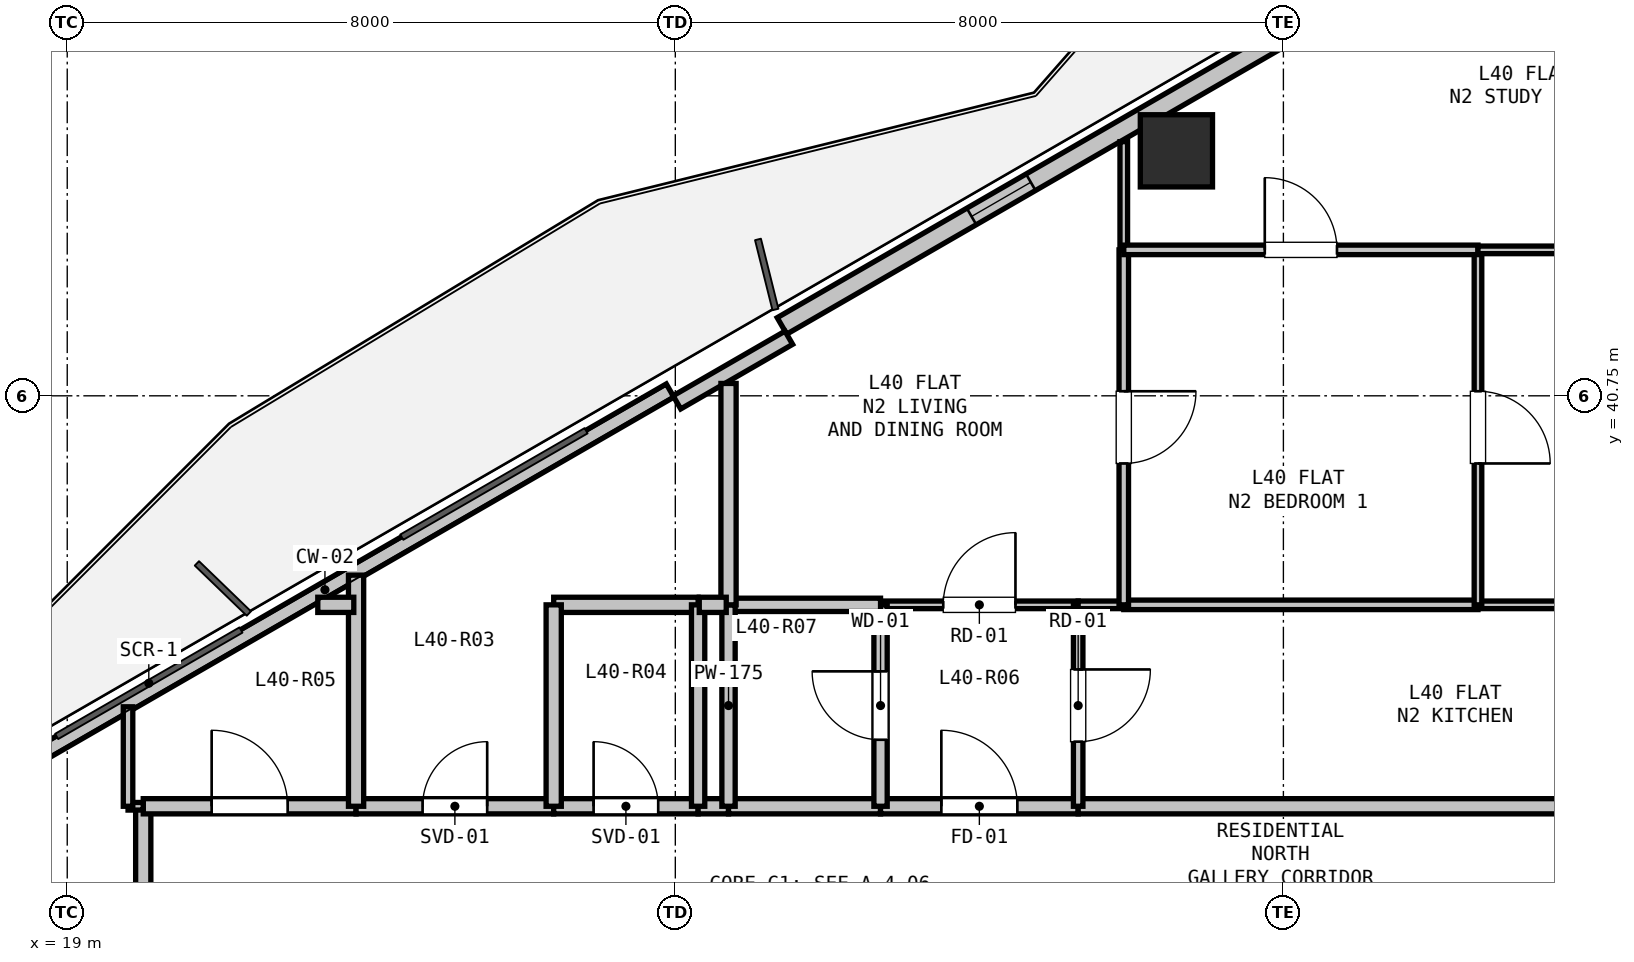
"""IFC4 building model, lengths in metres.
Left out: names, types, materials, properties, quantities, classifications, styles, units other than length and angle.
Written with IfcOpenShell. Run it as: python <this file> out.ifc"""

import sys

from ifc_helpers import new_model, si_unit, direction, frame, frame_2d, origin, origin_2d, place, context, subcontext, project, spatial, rectangle, hollow_rectangle, extrude, element, fill, save


model = new_model("IFC4")
c1 = context("Model", 3, precision=1e-05, world=origin(), true_north=direction((0.0, 1.0)))
c2 = subcontext(c1, "Body", "Model", "MODEL_VIEW")
j1 = project(units=[si_unit("LENGTHUNIT", "METRE"), si_unit("PLANEANGLEUNIT", "RADIAN")], contexts=[c1])
p1 = place(None, origin())
s1 = spatial("IfcSite", under=j1, at=p1, CompositionType="ELEMENT")
p2 = place(p1, origin())
s2 = spatial("IfcBuilding", under=s1, at=p2, CompositionType="ELEMENT")
p3 = place(p2, frame((0.0, 0.0, 144.3)))
s3 = spatial("IfcBuildingStorey", under=s2, at=p3, CompositionType="ELEMENT", Elevation=144.3)
p4 = place(p3, frame((33.593, 43.973, 0.0), z_axis=(0.0, 0.0, 1.0), x_axis=(1.0, 0.0, 0.0)))
e1 = element("IfcColumn", 1, at=p4, inside=s3, PredefinedType="COLUMN", context=c2, shape_type="SweptSolid", body=[
    extrude(hollow_rectangle(XDim=0.95, YDim=0.95, WallThickness=0.028, at=origin_2d()), origin(), (0.0, 0.0, 1.0), 3.3),
])
p5 = place(p3, frame((38.22, 47.338, 0.0), z_axis=(0.0, 0.0, 1.0), x_axis=(0.866035021055, -0.499983342029, 0.0)))
e2 = element("IfcWall", 2, at=p5, inside=s3, PredefinedType="SOLIDWALL", context=c2, shape_type="SweptSolid", body=[
    extrude(rectangle(XDim=4.617, YDim=0.25, at=frame_2d((2.309, 0.0))), origin(), (0.0, 0.0, 1.0), 2.68),
])
p6 = place(p3, frame((17.85, 35.577, 0.0), z_axis=(0.0, 0.0, 1.0), x_axis=(0.866026619769, 0.499997893847, 0.0)))
e3 = element("IfcWall", 3, at=p6, inside=s3, PredefinedType="PARAPET", context=c2, shape_type="SweptSolid", body=[
    extrude(rectangle(XDim=10.486, YDim=0.2, at=frame_2d((5.243, 0.0))), origin(), (0.0, 0.0, 1.0), 0.2),
])
p7 = place(p3, frame((28.403, 41.67, 0.0), z_axis=(0.0, 0.0, 1.0), x_axis=(0.86602239209, 0.500005216371, 0.0)))
e4 = element("IfcWall", 4, at=p7, inside=s3, PredefinedType="SOLIDWALL", context=c2, shape_type="SweptSolid", body=[
    extrude(rectangle(XDim=11.186, YDim=0.25, at=frame_2d((5.593, 0.0))), origin(), (0.0, 0.0, 1.0), 2.68),
])
p8 = place(p7, frame((2.88, 0.0, 0.9)))
e5 = element("IfcOpeningElement", 5, at=p8, cuts=e4, PredefinedType="OPENING", context=c2, shape_type="SweptSolid", body=[
    extrude(rectangle(XDim=0.9, YDim=1.4, at=frame_2d((0.45, 0.7))), frame((0.0, 0.135, 0.0), z_axis=(0.0, -1.0, 0.0), x_axis=(1.0, 0.0, 0.0)), (0.0, 0.0, 1.0), 0.27),
])
p9 = place(p3, frame((27.021, 40.664, 0.0), z_axis=(0.0, 0.0, 1.0), x_axis=(0.86605165483, 0.499954529098, 0.0)))
e6 = element("IfcWall", 6, at=p9, inside=s3, PredefinedType="PARAPET", context=c2, shape_type="SweptSolid", body=[
    extrude(rectangle(XDim=1.7, YDim=0.2, at=frame_2d((0.85, 0.0))), origin(), (0.0, 0.0, 1.0), 2.68),
])
p10 = place(p3, frame((20.0, 32.75, 0.0), z_axis=(0.0, 0.0, 1.0), x_axis=(0.0, 1.0, 0.0)))
e7 = element("IfcWall", 7, at=p10, inside=s3, PredefinedType="PARTITIONING", context=c2, shape_type="SweptSolid", body=[
    extrude(rectangle(XDim=2.6, YDim=0.2, at=frame_2d((1.3, 0.0))), origin(), (0.0, 0.0, 1.0), 2.433),
])
p11 = place(p3, frame((20.0, 35.35, 0.0), z_axis=(0.0, 0.0, 1.0), x_axis=(1.0, 0.0, 0.0)))
e8 = element("IfcWall", 8, at=p11, inside=s3, PredefinedType="PARTITIONING", context=c2, shape_type="SweptSolid", body=[
    extrude(rectangle(XDim=2.8, YDim=0.2, at=frame_2d((1.4, 0.0))), origin(), (0.0, 0.0, 1.0), 3.06),
])
p12 = place(p11, frame((0.9, 0.0, 0.0)))
e9 = element("IfcOpeningElement", 9, at=p12, cuts=e8, PredefinedType="OPENING", context=c2, shape_type="SweptSolid", body=[
    extrude(rectangle(XDim=1.0, YDim=2.15, at=frame_2d((0.5, 1.075))), frame((0.0, 0.11, 0.0), z_axis=(0.0, -1.0, 0.0), x_axis=(1.0, 0.0, 0.0)), (0.0, 0.0, 1.0), 0.22),
])
p13 = place(p3, frame((22.8, 35.35, 0.0), z_axis=(0.0, 0.0, 1.0), x_axis=(1.0, 0.0, 0.0)))
e10 = element("IfcWall", 10, at=p13, inside=s3, PredefinedType="PARTITIONING", context=c2, shape_type="SweptSolid", body=[
    extrude(rectangle(XDim=2.6, YDim=0.2, at=frame_2d((1.3, 0.0))), origin(), (0.0, 0.0, 1.0), 3.06),
])
p14 = place(p13, frame((0.875, 0.0, 0.0)))
e11 = element("IfcOpeningElement", 11, at=p14, cuts=e10, PredefinedType="OPENING", context=c2, shape_type="SweptSolid", body=[
    extrude(rectangle(XDim=0.85, YDim=2.1, at=frame_2d((0.425, 1.05))), frame((0.0, 0.11, 0.0), z_axis=(0.0, -1.0, 0.0), x_axis=(1.0, 0.0, 0.0)), (0.0, 0.0, 1.0), 0.22),
])
p15 = place(p3, frame((25.4, 35.35, 0.0), z_axis=(0.0, 0.0, 1.0), x_axis=(1.0, 0.0, 0.0)))
e12 = element("IfcWall", 12, at=p15, inside=s3, PredefinedType="PARTITIONING", context=c2, shape_type="SweptSolid", body=[
    extrude(rectangle(XDim=1.9, YDim=0.2, at=frame_2d((0.95, 0.0))), origin(), (0.0, 0.0, 1.0), 3.06),
])
p16 = place(p15, frame((0.525, 0.0, 0.0)))
e13 = element("IfcOpeningElement", 13, at=p16, cuts=e12, PredefinedType="OPENING", context=c2, shape_type="SweptSolid", body=[
    extrude(rectangle(XDim=0.85, YDim=2.1, at=frame_2d((0.425, 1.05))), frame((0.0, 0.11, 0.0), z_axis=(0.0, -1.0, 0.0), x_axis=(1.0, 0.0, 0.0)), (0.0, 0.0, 1.0), 0.22),
])
p17 = place(p3, frame((27.3, 35.35, 0.0), z_axis=(0.0, 0.0, 1.0), x_axis=(1.0, 0.0, 0.0)))
e14 = element("IfcWall", 14, at=p17, inside=s3, PredefinedType="PARTITIONING", context=c2, shape_type="SweptSolid", body=[
    extrude(rectangle(XDim=0.4, YDim=0.2, at=frame_2d((0.2, 0.0))), origin(), (0.0, 0.0, 1.0), 3.06),
])
p18 = place(p3, frame((27.7, 35.35, 0.0), z_axis=(0.0, 0.0, 1.0), x_axis=(1.0, 0.0, 0.0)))
e15 = element("IfcWall", 15, at=p18, inside=s3, PredefinedType="PARTITIONING", context=c2, shape_type="SweptSolid", body=[
    extrude(rectangle(XDim=2.0, YDim=0.2, at=frame_2d((1.0, 0.0))), origin(), (0.0, 0.0, 1.0), 3.06),
])
p19 = place(p3, frame((29.7, 35.35, 0.0), z_axis=(0.0, 0.0, 1.0), x_axis=(1.0, 0.0, 0.0)))
e16 = element("IfcWall", 16, at=p19, inside=s3, PredefinedType="PARTITIONING", context=c2, shape_type="SweptSolid", body=[
    extrude(rectangle(XDim=2.6, YDim=0.2, at=frame_2d((1.3, 0.0))), origin(), (0.0, 0.0, 1.0), 3.06),
])
p20 = place(p19, frame((0.8, 0.0, 0.0)))
e17 = element("IfcOpeningElement", 17, at=p20, cuts=e16, PredefinedType="OPENING", context=c2, shape_type="SweptSolid", body=[
    extrude(rectangle(XDim=1.0, YDim=2.15, at=frame_2d((0.5, 1.075))), frame((0.0, 0.11, 0.0), z_axis=(0.0, -1.0, 0.0), x_axis=(1.0, 0.0, 0.0)), (0.0, 0.0, 1.0), 0.22),
])
p21 = place(p3, frame((32.3, 35.35, 0.0), z_axis=(0.0, 0.0, 1.0), x_axis=(1.0, 0.0, 0.0)))
e18 = element("IfcWall", 18, at=p21, inside=s3, PredefinedType="PARTITIONING", context=c2, shape_type="SweptSolid", body=[
    extrude(rectangle(XDim=6.9, YDim=0.2, at=frame_2d((3.45, 0.0))), origin(), (0.0, 0.0, 1.0), 2.433),
])
p22 = place(p3, frame((29.7, 38.0, 0.0), z_axis=(0.0, 0.0, 1.0), x_axis=(1.0, 0.0, 0.0)))
e19 = element("IfcWall", 19, at=p22, inside=s3, PredefinedType="PARTITIONING", context=c2, shape_type="SweptSolid", body=[
    extrude(rectangle(XDim=2.6, YDim=0.1, at=frame_2d((1.3, 0.0))), origin(), (0.0, 0.0, 1.0), 3.06),
])
p23 = place(p22, frame((0.825, 0.0, 0.0)))
e20 = element("IfcOpeningElement", 20, at=p23, cuts=e19, PredefinedType="OPENING", context=c2, shape_type="SweptSolid", body=[
    extrude(rectangle(XDim=0.95, YDim=2.1, at=frame_2d((0.475, 1.05))), frame((0.0, 0.06, 0.0), z_axis=(0.0, -1.0, 0.0), x_axis=(1.0, 0.0, 0.0)), (0.0, 0.0, 1.0), 0.12),
])
p24 = place(p3, frame((32.3, 38.0, 0.0), z_axis=(0.0, 0.0, 1.0), x_axis=(0.0, -1.0, 0.0)))
e21 = element("IfcWall", 21, at=p24, inside=s3, PredefinedType="PARTITIONING", context=c2, shape_type="SweptSolid", body=[
    extrude(rectangle(XDim=2.65, YDim=0.125, at=frame_2d((1.325, 0.0))), origin(), (0.0, 0.0, 1.0), 3.06),
])
p25 = place(p24, frame((0.85, 0.0, 0.0)))
e22 = element("IfcOpeningElement", 22, at=p25, cuts=e21, PredefinedType="OPENING", context=c2, shape_type="SweptSolid", body=[
    extrude(rectangle(XDim=0.95, YDim=2.1, at=frame_2d((0.475, 1.05))), frame((0.0, 0.073, 0.0), z_axis=(0.0, -1.0, 0.0), x_axis=(1.0, 0.0, 0.0)), (0.0, 0.0, 1.0), 0.145),
])
p26 = place(p3, frame((29.7, 35.35, 0.0), z_axis=(0.0, 0.0, 1.0), x_axis=(0.0, 1.0, 0.0)))
e23 = element("IfcWall", 23, at=p26, inside=s3, PredefinedType="PLUMBINGWALL", context=c2, shape_type="SweptSolid", body=[
    extrude(rectangle(XDim=2.65, YDim=0.175, at=frame_2d((1.325, 0.0))), origin(), (0.0, 0.0, 1.0), 3.06),
])
p27 = place(p26, frame((0.875, 0.0, 0.0)))
e24 = element("IfcOpeningElement", 24, at=p27, cuts=e23, PredefinedType="OPENING", context=c2, shape_type="SweptSolid", body=[
    extrude(rectangle(XDim=0.9, YDim=2.1, at=frame_2d((0.45, 1.05))), frame((0.0, 0.097, 0.0), z_axis=(0.0, -1.0, 0.0), x_axis=(1.0, 0.0, 0.0)), (0.0, 0.0, 1.0), 0.195),
])
p28 = place(p3, frame((25.4, 38.0, 0.0), z_axis=(0.0, 0.0, 1.0), x_axis=(1.0, 0.0, 0.0)))
e25 = element("IfcWall", 25, at=p28, inside=s3, PredefinedType="PARTITIONING", context=c2, shape_type="SweptSolid", body=[
    extrude(rectangle(XDim=1.9, YDim=0.2, at=frame_2d((0.95, 0.0))), origin(), (0.0, 0.0, 1.0), 3.06),
])
p29 = place(p3, frame((27.3, 38.0, 0.0), z_axis=(0.0, 0.0, 1.0), x_axis=(0.0, -1.0, 0.0)))
e26 = element("IfcWall", 26, at=p29, inside=s3, PredefinedType="PLUMBINGWALL", context=c2, shape_type="SweptSolid", body=[
    extrude(rectangle(XDim=2.65, YDim=0.175, at=frame_2d((1.325, 0.0))), origin(), (0.0, 0.0, 1.0), 3.06),
])
p30 = place(p3, frame((25.4, 35.35, 0.0), z_axis=(0.0, 0.0, 1.0), x_axis=(0.0, 1.0, 0.0)))
e27 = element("IfcWall", 27, at=p30, inside=s3, PredefinedType="PARTITIONING", context=c2, shape_type="SweptSolid", body=[
    extrude(rectangle(XDim=2.65, YDim=0.2, at=frame_2d((1.325, 0.0))), origin(), (0.0, 0.0, 1.0), 3.06),
])
p31 = place(p3, frame((27.7, 38.0, 0.0), z_axis=(0.0, 0.0, 1.0), x_axis=(1.0, 0.0, 0.0)))
e28 = element("IfcWall", 28, at=p31, inside=s3, PredefinedType="PLUMBINGWALL", context=c2, shape_type="SweptSolid", body=[
    extrude(rectangle(XDim=2.0, YDim=0.175, at=frame_2d((1.0, 0.0))), origin(), (0.0, 0.0, 1.0), 3.06),
])
p32 = place(p3, frame((27.7, 35.35, 0.0), z_axis=(0.0, 0.0, 1.0), x_axis=(0.0, 1.0, 0.0)))
e29 = element("IfcWall", 29, at=p32, inside=s3, PredefinedType="PLUMBINGWALL", context=c2, shape_type="SweptSolid", body=[
    extrude(rectangle(XDim=2.65, YDim=0.175, at=frame_2d((1.325, 0.0))), origin(), (0.0, 0.0, 1.0), 3.06),
])
p33 = place(p3, frame((32.3, 38.0, 0.0), z_axis=(0.0, 0.0, 1.0), x_axis=(1.0, 0.0, 0.0)))
e30 = element("IfcWall", 30, at=p33, inside=s3, PredefinedType="PARTITIONING", context=c2, shape_type="SweptSolid", body=[
    extrude(rectangle(XDim=0.6, YDim=0.1, at=frame_2d((0.3, 0.0))), origin(), (0.0, 0.0, 1.0), 3.06),
])
p34 = place(p3, frame((32.9, 38.0, 0.0), z_axis=(0.0, 0.0, 1.0), x_axis=(1.0, 0.0, 0.0)))
e31 = element("IfcWall", 31, at=p34, inside=s3, PredefinedType="PARTITIONING", context=c2, shape_type="SweptSolid", body=[
    extrude(rectangle(XDim=4.66, YDim=0.125, at=frame_2d((2.33, 0.0))), origin(), (0.0, 0.0, 1.0), 2.433),
])
p35 = place(p3, frame((37.56, 38.0, 0.0), z_axis=(0.0, 0.0, 1.0), x_axis=(1.0, 0.0, 0.0)))
e32 = element("IfcWall", 32, at=p35, inside=s3, PredefinedType="PARTITIONING", context=c2, shape_type="SweptSolid", body=[
    extrude(rectangle(XDim=4.51, YDim=0.1, at=frame_2d((2.255, 0.0))), origin(), (0.0, 0.0, 1.0), 2.365),
])
p36 = place(p3, frame((27.7, 40.913, 0.0), z_axis=(0.0, 0.0, 1.0), x_axis=(0.0, -1.0, 0.0)))
e33 = element("IfcWall", 33, at=p36, inside=s3, PredefinedType="PARTITIONING", context=c2, shape_type="SweptSolid", body=[
    extrude(rectangle(XDim=2.913, YDim=0.2, at=frame_2d((1.456, 0.0))), origin(), (0.0, 0.0, 1.0), 2.365),
])
p37 = place(p3, frame((27.67, 38.0, 0.0), z_axis=(0.0, 0.0, 1.0), x_axis=(-1.0, 0.0, 0.0)))
e34 = element("IfcWall", 34, at=p37, inside=s3, PredefinedType="PARTITIONING", context=c2, shape_type="SweptSolid", body=[
    extrude(rectangle(XDim=0.355, YDim=0.2, at=frame_2d((0.177, 0.0))), origin(), (0.0, 0.0, 1.0), 3.06),
])
p38 = place(p3, frame((22.8, 35.35, 0.0), z_axis=(0.0, 0.0, 1.0), x_axis=(0.0, 1.0, 0.0)))
e35 = element("IfcWall", 35, at=p38, inside=s3, PredefinedType="PARTITIONING", context=c2, shape_type="SweptSolid", body=[
    extrude(rectangle(XDim=3.041, YDim=0.2, at=frame_2d((1.52, 0.0))), origin(), (0.0, 0.0, 1.0), 2.365),
])
p39 = place(p3, frame((22.77, 38.0, 0.0), z_axis=(0.0, 0.0, 1.0), x_axis=(-1.0, 0.0, 0.0)))
e36 = element("IfcWall", 36, at=p39, inside=s3, PredefinedType="PARTITIONING", context=c2, shape_type="SweptSolid", body=[
    extrude(rectangle(XDim=0.474, YDim=0.2, at=frame_2d((0.237, 0.0))), origin(), (0.0, 0.0, 1.0), 3.06),
])
p40 = place(p3, frame((20.0, 35.35, 0.0), z_axis=(0.0, 0.0, 1.0), x_axis=(-1.0, 0.0, 0.0)))
e37 = element("IfcWall", 37, at=p40, inside=s3, PredefinedType="PARTITIONING", context=c2, shape_type="SweptSolid", body=[
    extrude(rectangle(XDim=0.2, YDim=0.1, at=frame_2d((0.1, 0.0))), origin(), (0.0, 0.0, 1.0), 3.06),
])
p41 = place(p3, frame((19.8, 35.35, 0.0), z_axis=(0.0, 0.0, 1.0), x_axis=(0.0, 1.0, 0.0)))
e38 = element("IfcWall", 38, at=p41, inside=s3, PredefinedType="PARTITIONING", context=c2, shape_type="SweptSolid", body=[
    extrude(rectangle(XDim=1.309, YDim=0.125, at=frame_2d((0.654, 0.0))), origin(), (0.0, 0.0, 1.0), 2.365),
])
p42 = place(p3, frame((32.9, 44.094, 0.0), z_axis=(0.0, 0.0, 1.0), x_axis=(0.0, -1.0, 0.0)))
e39 = element("IfcWall", 39, at=p42, inside=s3, PredefinedType="PARTITIONING", context=c2, shape_type="SweptSolid", body=[
    extrude(rectangle(XDim=1.424, YDim=0.1, at=frame_2d((0.712, 0.0))), origin(), (0.0, 0.0, 1.0), 2.365),
])
p43 = place(p3, frame((32.9, 42.67, 0.0), z_axis=(0.0, 0.0, 1.0), x_axis=(0.0, -1.0, 0.0)))
e40 = element("IfcWall", 40, at=p43, inside=s3, PredefinedType="PARTITIONING", context=c2, shape_type="SweptSolid", body=[
    extrude(rectangle(XDim=4.67, YDim=0.125, at=frame_2d((2.335, 0.0))), origin(), (0.0, 0.0, 1.0), 3.06),
])
p44 = place(p43, frame((1.86, 0.0, 0.0)))
e41 = element("IfcOpeningElement", 41, at=p44, cuts=e40, PredefinedType="OPENING", context=c2, shape_type="SweptSolid", body=[
    extrude(rectangle(XDim=0.95, YDim=2.1, at=frame_2d((0.475, 1.05))), frame((0.0, 0.073, 0.0), z_axis=(0.0, -1.0, 0.0), x_axis=(1.0, 0.0, 0.0)), (0.0, 0.0, 1.0), 0.145),
])
p45 = place(p3, frame((37.56, 42.67, 0.0), z_axis=(0.0, 0.0, 1.0), x_axis=(0.0, -1.0, 0.0)))
e42 = element("IfcWall", 42, at=p45, inside=s3, PredefinedType="PARTITIONING", context=c2, shape_type="SweptSolid", body=[
    extrude(rectangle(XDim=4.67, YDim=0.1, at=frame_2d((2.335, 0.0))), origin(), (0.0, 0.0, 1.0), 2.433),
])
p46 = place(p45, frame((1.86, 0.0, 0.0)))
e43 = element("IfcOpeningElement", 43, at=p46, cuts=e42, PredefinedType="OPENING", context=c2, shape_type="SweptSolid", body=[
    extrude(rectangle(XDim=0.95, YDim=2.1, at=frame_2d((0.475, 1.05))), frame((0.0, 0.06, 0.0), z_axis=(0.0, -1.0, 0.0), x_axis=(1.0, 0.0, 0.0)), (0.0, 0.0, 1.0), 0.12),
])
p47 = place(p3, frame((32.9, 42.67, 0.0), z_axis=(0.0, 0.0, 1.0), x_axis=(1.0, 0.0, 0.0)))
e44 = element("IfcWall", 44, at=p47, inside=s3, PredefinedType="PARTITIONING", context=c2, shape_type="SweptSolid", body=[
    extrude(rectangle(XDim=4.66, YDim=0.125, at=frame_2d((2.33, 0.0))), origin(), (0.0, 0.0, 1.0), 2.433),
])
p48 = place(p47, frame((1.855, 0.0, 0.0)))
e45 = element("IfcOpeningElement", 45, at=p48, cuts=e44, PredefinedType="OPENING", context=c2, shape_type="SweptSolid", body=[
    extrude(rectangle(XDim=0.95, YDim=2.1, at=frame_2d((0.475, 1.05))), frame((0.0, 0.073, 0.0), z_axis=(0.0, -1.0, 0.0), x_axis=(1.0, 0.0, 0.0)), (0.0, 0.0, 1.0), 0.145),
])
p49 = place(p3, frame((37.56, 42.67, 0.0), z_axis=(0.0, 0.0, 1.0), x_axis=(1.0, 0.0, 0.0)))
e46 = element("IfcWall", 46, at=p49, inside=s3, PredefinedType="PARTITIONING", context=c2, shape_type="SweptSolid", body=[
    extrude(rectangle(XDim=4.51, YDim=0.1, at=frame_2d((2.255, 0.0))), origin(), (0.0, 0.0, 1.0), 2.433),
])
p50 = place(p8, origin())
e47 = element("IfcWindow", 47, at=p50, inside=s3, PartitioningType="SINGLE_PANEL", PredefinedType="WINDOW", context=c2, shape_type="SweptSolid", body=[
    extrude(rectangle(XDim=0.9, YDim=1.4, at=frame_2d((0.45, 0.7))), frame((0.0, 0.03, 0.0), z_axis=(0.0, -1.0, 0.0), x_axis=(1.0, 0.0, 0.0)), (0.0, 0.0, 1.0), 0.06),
])
fill(e5, e47)
p51 = place(p20, origin())
e48 = element("IfcDoor", 48, at=p51, inside=s3, OperationType="SINGLE_SWING_LEFT", PredefinedType="DOOR", context=c2, shape_type="SweptSolid", body=[
    extrude(rectangle(XDim=1.0, YDim=2.15, at=frame_2d((0.5, 1.075))), frame((0.0, 0.025, 0.0), z_axis=(0.0, -1.0, 0.0), x_axis=(1.0, 0.0, 0.0)), (0.0, 0.0, 1.0), 0.05),
])
fill(e17, e48)
p52 = place(p16, origin())
e49 = element("IfcDoor", 49, at=p52, inside=s3, OperationType="SINGLE_SWING_LEFT", PredefinedType="DOOR", context=c2, shape_type="SweptSolid", body=[
    extrude(rectangle(XDim=0.85, YDim=2.1, at=frame_2d((0.425, 1.05))), frame((0.0, 0.025, 0.0), z_axis=(0.0, -1.0, 0.0), x_axis=(1.0, 0.0, 0.0)), (0.0, 0.0, 1.0), 0.05),
])
fill(e13, e49)
p53 = place(p14, origin())
e50 = element("IfcDoor", 50, at=p53, inside=s3, OperationType="SINGLE_SWING_RIGHT", PredefinedType="DOOR", context=c2, shape_type="SweptSolid", body=[
    extrude(rectangle(XDim=0.85, YDim=2.1, at=frame_2d((0.425, 1.05))), frame((0.0, 0.025, 0.0), z_axis=(0.0, -1.0, 0.0), x_axis=(1.0, 0.0, 0.0)), (0.0, 0.0, 1.0), 0.05),
])
fill(e11, e50)
p54 = place(p12, origin())
e51 = element("IfcDoor", 51, at=p54, inside=s3, OperationType="SINGLE_SWING_LEFT", PredefinedType="DOOR", context=c2, shape_type="SweptSolid", body=[
    extrude(rectangle(XDim=1.0, YDim=2.15, at=frame_2d((0.5, 1.075))), frame((0.0, 0.025, 0.0), z_axis=(0.0, -1.0, 0.0), x_axis=(1.0, 0.0, 0.0)), (0.0, 0.0, 1.0), 0.05),
])
fill(e9, e51)
p55 = place(p27, origin())
e52 = element("IfcDoor", 52, at=p55, inside=s3, OperationType="SINGLE_SWING_RIGHT", PredefinedType="DOOR", context=c2, shape_type="SweptSolid", body=[
    extrude(rectangle(XDim=0.9, YDim=2.1, at=frame_2d((0.45, 1.05))), frame((0.0, 0.025, 0.0), z_axis=(0.0, -1.0, 0.0), x_axis=(1.0, 0.0, 0.0)), (0.0, 0.0, 1.0), 0.05),
])
fill(e24, e52)
p56 = place(p25, origin())
e53 = element("IfcDoor", 53, at=p56, inside=s3, OperationType="SINGLE_SWING_LEFT", PredefinedType="DOOR", context=c2, shape_type="SweptSolid", body=[
    extrude(rectangle(XDim=0.95, YDim=2.1, at=frame_2d((0.475, 1.05))), frame((0.0, 0.025, 0.0), z_axis=(0.0, -1.0, 0.0), x_axis=(1.0, 0.0, 0.0)), (0.0, 0.0, 1.0), 0.05),
])
fill(e22, e53)
p57 = place(p23, origin())
e54 = element("IfcDoor", 54, at=p57, inside=s3, OperationType="SINGLE_SWING_RIGHT", PredefinedType="DOOR", context=c2, shape_type="SweptSolid", body=[
    extrude(rectangle(XDim=0.95, YDim=2.1, at=frame_2d((0.475, 1.05))), frame((0.0, 0.025, 0.0), z_axis=(0.0, -1.0, 0.0), x_axis=(1.0, 0.0, 0.0)), (0.0, 0.0, 1.0), 0.05),
])
fill(e20, e54)
p58 = place(p44, origin())
e55 = element("IfcDoor", 55, at=p58, inside=s3, OperationType="SINGLE_SWING_LEFT", PredefinedType="DOOR", context=c2, shape_type="SweptSolid", body=[
    extrude(rectangle(XDim=0.95, YDim=2.1, at=frame_2d((0.475, 1.05))), frame((0.0, 0.025, 0.0), z_axis=(0.0, -1.0, 0.0), x_axis=(1.0, 0.0, 0.0)), (0.0, 0.0, 1.0), 0.05),
])
fill(e41, e55)
p59 = place(p46, origin())
e56 = element("IfcDoor", 56, at=p59, inside=s3, OperationType="SINGLE_SWING_RIGHT", PredefinedType="DOOR", context=c2, shape_type="SweptSolid", body=[
    extrude(rectangle(XDim=0.95, YDim=2.1, at=frame_2d((0.475, 1.05))), frame((0.0, 0.025, 0.0), z_axis=(0.0, -1.0, 0.0), x_axis=(1.0, 0.0, 0.0)), (0.0, 0.0, 1.0), 0.05),
])
fill(e43, e56)
p60 = place(p48, origin())
e57 = element("IfcDoor", 57, at=p60, inside=s3, OperationType="SINGLE_SWING_LEFT", PredefinedType="DOOR", context=c2, shape_type="SweptSolid", body=[
    extrude(rectangle(XDim=0.95, YDim=2.1, at=frame_2d((0.475, 1.05))), frame((0.0, 0.025, 0.0), z_axis=(0.0, -1.0, 0.0), x_axis=(1.0, 0.0, 0.0)), (0.0, 0.0, 1.0), 0.05),
])
fill(e45, e57)
save(model, sys.argv[1])
